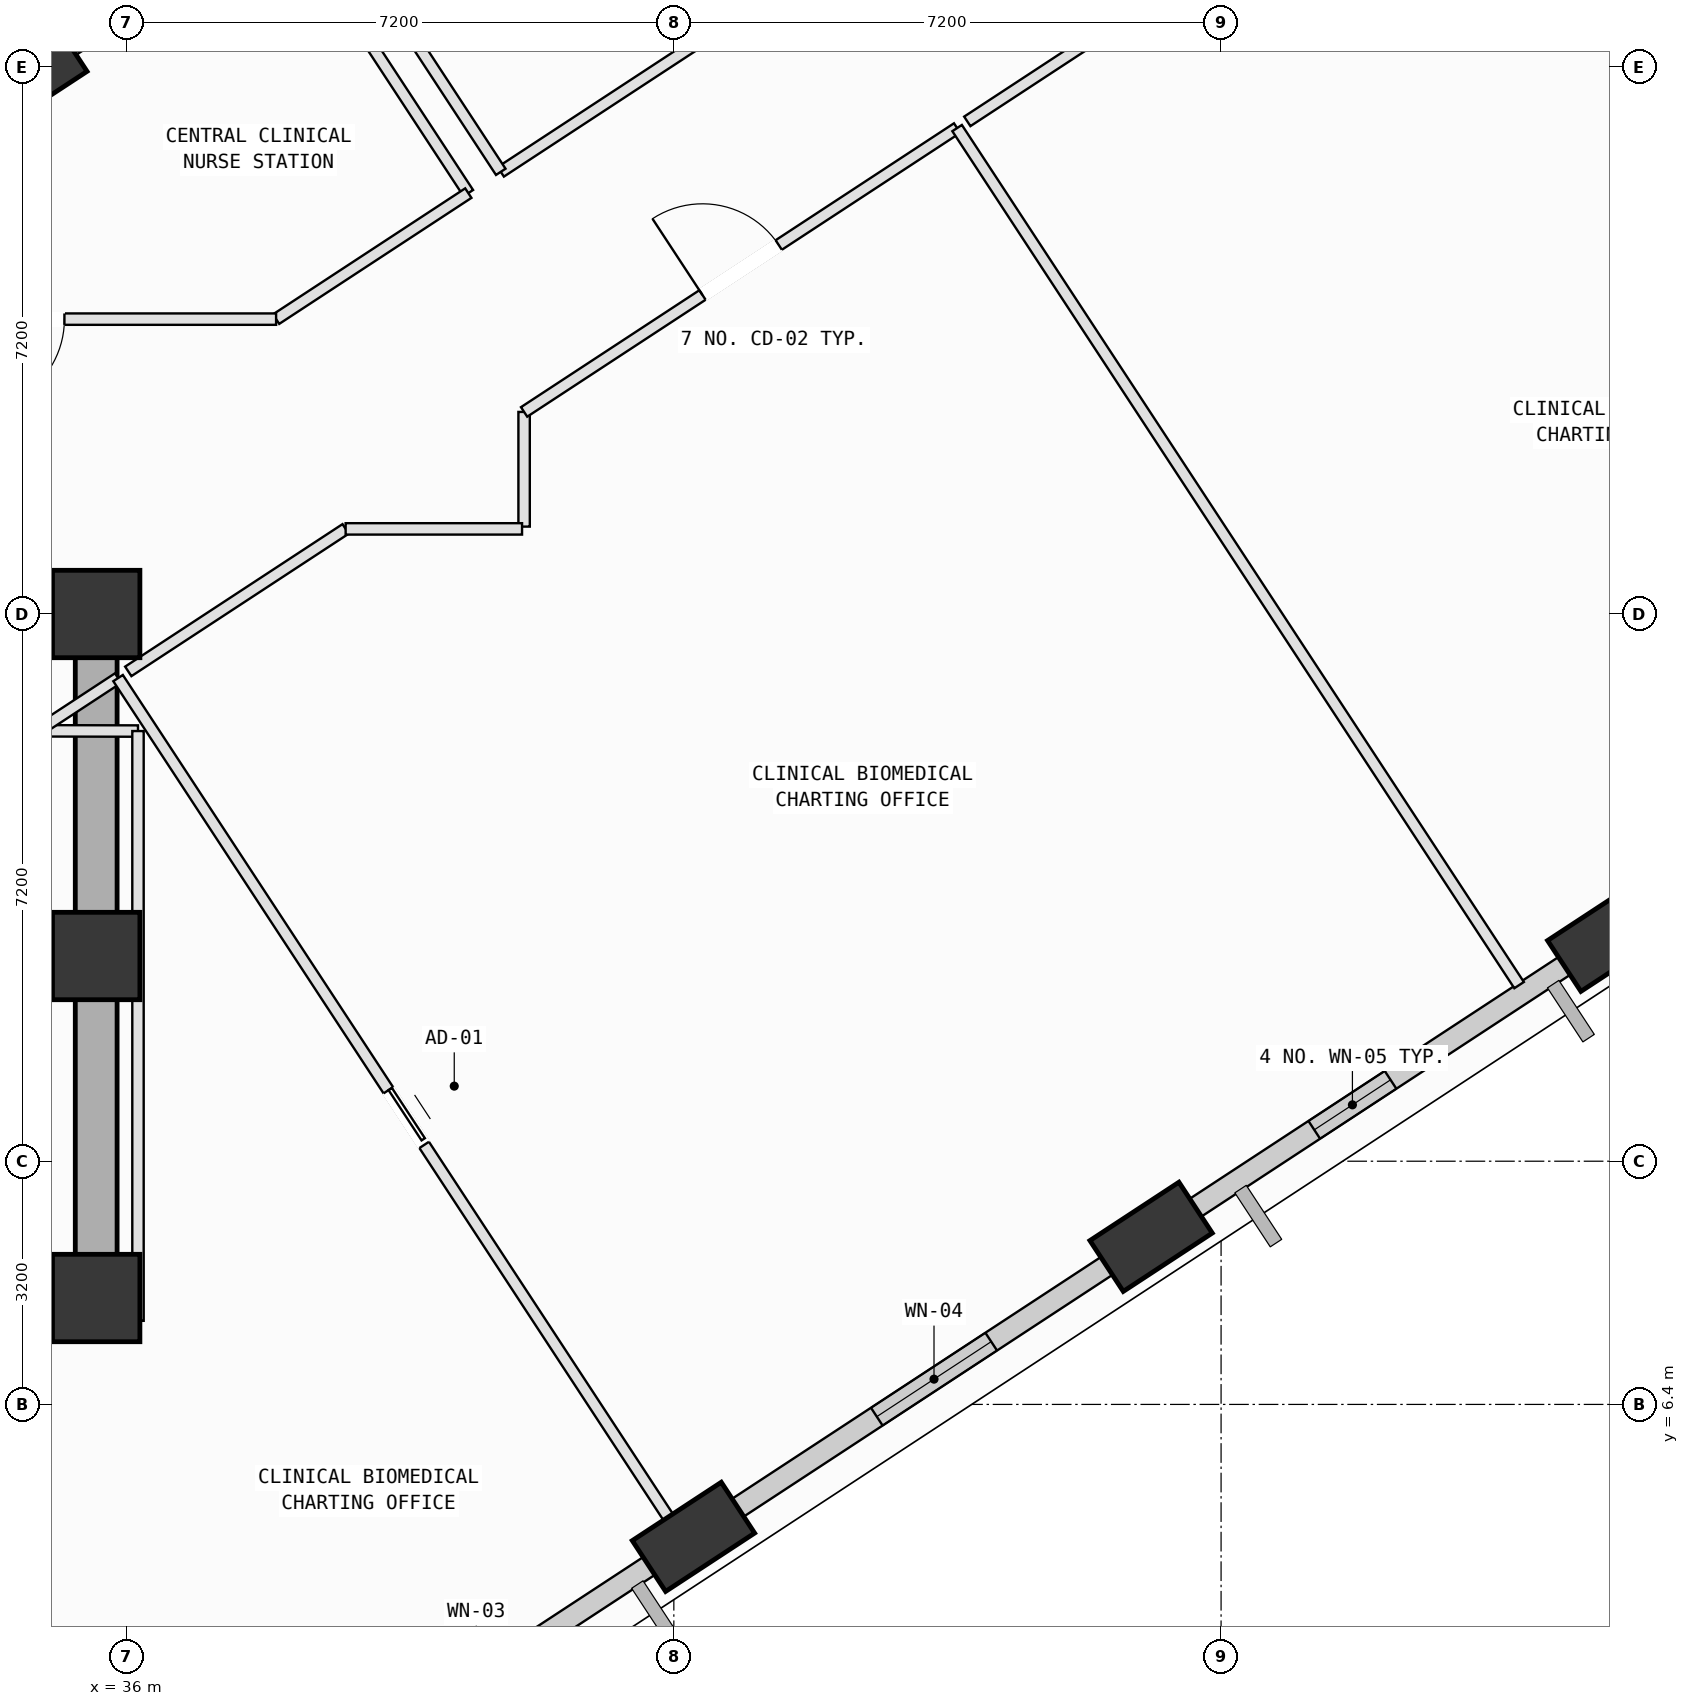
"""IFC4 building model, lengths in metres.
Left out: names, types, materials, properties, quantities, classifications, styles, units other than length and angle.
Written with IfcOpenShell. Run it as: python <this file> out.ifc"""

import sys

from ifc_helpers import new_model, si_unit, direction, frame, frame_2d, origin, origin_2d, place, context, subcontext, project, spatial, rectangle, extrude, element, fill, save


model = new_model("IFC4")
c1 = context("Model", 3, precision=1e-05, world=origin(), true_north=direction((0.0, 1.0)))
c2 = subcontext(c1, "Body", "Model", "MODEL_VIEW")
j1 = project(units=[si_unit("LENGTHUNIT", "METRE"), si_unit("PLANEANGLEUNIT", "RADIAN")], contexts=[c1])
p1 = place(None, origin())
s1 = spatial("IfcSite", under=j1, at=p1, CompositionType="ELEMENT")
p2 = place(p1, origin())
s2 = spatial("IfcBuilding", under=s1, at=p2, CompositionType="ELEMENT")
p3 = place(p2, frame((0.0, 0.0, 165.8)))
s3 = spatial("IfcBuildingStorey", under=s2, at=p3, CompositionType="ELEMENT", Elevation=165.8)
for number, where, z_axis, x_axis in (
    (1, (35.6, 7.8, 0.0), (0.0, 0.0, 1.0), (1.0, 0.0, 0.0)),
    (2, (35.6, 12.3, 0.0), (0.0, 0.0, 1.0), (1.0, 0.0, 0.0)),
    (3, (35.6, 16.8, 0.0), (0.0, 0.0, 1.0), (1.0, 0.0, 0.0)),
):
    element("IfcColumn", number, at=place(p3, frame(where, z_axis=z_axis, x_axis=x_axis)), inside=s3, PredefinedType="COLUMN", context=c2, shape_type="SweptSolid", body=[
        extrude(rectangle(XDim=1.15, YDim=1.15, at=origin_2d()), origin(), (0.0, 0.0, 1.0), 4.0),
    ])
p4 = place(p3, frame((43.458, 4.657, 0.002), z_axis=(0.082788142261, 0.041363656677, 0.995708376688), x_axis=(-0.862154123845, 0.504098662124, 0.050742542141)))
e4 = element("IfcColumn", 4, at=p4, inside=s3, PredefinedType="COLUMN", context=c2, shape_type="SweptSolid", body=[
    extrude(rectangle(XDim=1.4, YDim=0.8, at=origin_2d()), origin(), (0.0, 0.0, 1.0), 4.014),
])
p5 = place(p3, frame((49.479, 8.605, 0.002), z_axis=(0.066296769237, 0.066114301065, 0.995607170315), x_axis=(-0.977058462441, 0.206691483107, 0.051336067073)))
e5 = element("IfcColumn", 5, at=p5, inside=s3, PredefinedType="COLUMN", context=c2, shape_type="SweptSolid", body=[
    extrude(rectangle(XDim=1.4, YDim=0.8, at=origin_2d()), origin(), (0.0, 0.0, 1.0), 4.014),
])
p6 = place(p3, frame((55.5, 12.553, 0.002), z_axis=(0.049765035184, 0.090719410903, 0.994632308825), x_axis=(-0.995498317814, -0.07592385374, 0.056733302946)))
e6 = element("IfcColumn", 6, at=p6, inside=s3, PredefinedType="COLUMN", context=c2, shape_type="SweptSolid", body=[
    extrude(rectangle(XDim=1.4, YDim=0.8, at=origin_2d()), origin(), (0.0, 0.0, 1.0), 4.018),
])
p7 = place(p3, frame((34.675, 23.89, 0.002), z_axis=(0.003726493364, 0.004459574025, 0.999983112581), x_axis=(-0.99330109932, 0.115510919824, 0.003186454268)))
e7 = element("IfcColumn", 7, at=p7, inside=s3, PredefinedType="COLUMN", context=c2, shape_type="SweptSolid", body=[
    extrude(rectangle(XDim=1.4, YDim=0.8, at=origin_2d()), origin(), (0.0, 0.0, 1.0), 3.996),
])
p8 = place(p3, frame((43.198, 4.487, 0.0), z_axis=(0.0, 0.0, 1.0), x_axis=(-0.836280987902, -0.548301111865, 0.0)))
e8 = element("IfcWall", 8, at=p8, inside=s3, PredefinedType="SOLIDWALL", context=c2, shape_type="SweptSolid", body=[
    extrude(rectangle(XDim=6.214, YDim=0.28, at=frame_2d((3.107, 0.0))), origin(), (0.0, 0.0, 1.0), 3.165),
])
p9 = place(p8, frame((2.406, 0.0, 0.75)))
e9 = element("IfcOpeningElement", 9, at=p9, cuts=e8, PredefinedType="OPENING", context=c2, shape_type="SweptSolid", body=[
    extrude(rectangle(XDim=1.4, YDim=1.85, at=frame_2d((0.7, 0.925))), frame((0.0, 0.15, 0.0), z_axis=(0.0, -1.0, 0.0), x_axis=(1.0, 0.0, 0.0)), (0.0, 0.0, 1.0), 0.3),
])
p10 = place(p3, frame((49.219, 8.435, 0.0), z_axis=(0.0, 0.0, 1.0), x_axis=(-0.836296386282, -0.548277625197, 0.0)))
e10 = element("IfcWall", 10, at=p10, inside=s3, PredefinedType="SOLIDWALL", context=c2, shape_type="SweptSolid", body=[
    extrude(rectangle(XDim=6.209, YDim=0.28, at=frame_2d((3.104, 0.0))), origin(), (0.0, 0.0, 1.0), 3.165),
])
p11 = place(p10, frame((2.205, 0.0, 0.75)))
e11 = element("IfcOpeningElement", 11, at=p11, cuts=e10, PredefinedType="OPENING", context=c2, shape_type="SweptSolid", body=[
    extrude(rectangle(XDim=1.8, YDim=2.05, at=frame_2d((0.9, 1.025))), frame((0.0, 0.15, 0.0), z_axis=(0.0, -1.0, 0.0), x_axis=(1.0, 0.0, 0.0)), (0.0, 0.0, 1.0), 0.3),
])
p12 = place(p3, frame((55.247, 12.387, 0.0), z_axis=(0.0, 0.0, 1.0), x_axis=(-0.836284210267, -0.548296197013, 0.0)))
e12 = element("IfcWall", 12, at=p12, inside=s3, PredefinedType="SOLIDWALL", context=c2, shape_type="SweptSolid", body=[
    extrude(rectangle(XDim=6.218, YDim=0.28, at=frame_2d((3.109, 0.0))), origin(), (0.0, 0.0, 1.0), 3.165),
])
p13 = place(p12, frame((3.13, 0.0, 0.75)))
e13 = element("IfcOpeningElement", 13, at=p13, cuts=e12, PredefinedType="OPENING", context=c2, shape_type="SweptSolid", body=[
    extrude(rectangle(XDim=1.2, YDim=1.75, at=frame_2d((0.6, 0.875))), frame((0.0, 0.15, 0.0), z_axis=(0.0, -1.0, 0.0), x_axis=(1.0, 0.0, 0.0)), (0.0, 0.0, 1.0), 0.3),
])
p14 = place(p3, frame((35.099, 24.168, 0.0), z_axis=(0.0, 0.0, 1.0), x_axis=(0.836267517438, 0.548321656765, 0.0)))
e14 = element("IfcWall", 14, at=p14, inside=s3, PredefinedType="SOLIDWALL", context=c2, shape_type="SweptSolid", body=[
    extrude(rectangle(XDim=3.33, YDim=0.28, at=frame_2d((1.665, 0.0))), origin(), (0.0, 0.0, 1.0), 3.145),
])
p15 = place(p14, frame((0.74, 0.0, 0.75)))
e15 = element("IfcOpeningElement", 15, at=p15, cuts=e14, PredefinedType="OPENING", context=c2, shape_type="SweptSolid", body=[
    extrude(rectangle(XDim=2.0, YDim=1.95, at=frame_2d((1.0, 0.975))), frame((0.0, 0.15, 0.0), z_axis=(0.0, -1.0, 0.0), x_axis=(1.0, 0.0, 0.0)), (0.0, 0.0, 1.0), 0.3),
])
p16 = place(p3, frame((24.8, 7.8, 0.0), z_axis=(0.0, 0.0, 1.0), x_axis=(1.0, 0.0, 0.0)))
e16 = element("IfcWall", 16, at=p16, inside=s3, PredefinedType="SHEAR", context=c2, shape_type="SweptSolid", body=[
    extrude(rectangle(XDim=10.8, YDim=0.55, at=frame_2d((5.4, 0.0))), origin(), (0.0, 0.0, 1.0), 3.78),
])
p17 = place(p3, frame((35.6, 7.8, 0.0), z_axis=(0.0, 0.0, 1.0), x_axis=(0.0, 1.0, 0.0)))
e17 = element("IfcWall", 17, at=p17, inside=s3, PredefinedType="SHEAR", context=c2, shape_type="SweptSolid", body=[
    extrude(rectangle(XDim=9.0, YDim=0.55, at=frame_2d((4.5, 0.0))), origin(), (0.0, 0.0, 1.0), 3.78),
])
p18 = place(p3, frame((36.15, 15.26, 0.0), z_axis=(0.0, 0.0, 1.0), x_axis=(-0.999997459877, 0.002253938677, 0.0)))
e18 = element("IfcWall", 18, at=p18, inside=s3, PredefinedType="PARTITIONING", context=c2, shape_type="SweptSolid", body=[
    extrude(rectangle(XDim=1.3, YDim=0.15, at=frame_2d((0.65, 0.0))), origin(), (0.0, 0.0, 1.0), 3.78),
])
p19 = place(p3, frame((34.85, 15.276, 0.0), z_axis=(0.0, 0.0, 1.0), x_axis=(0.836022538156, 0.548695102671, 0.0)))
e19 = element("IfcWall", 19, at=p19, inside=s3, PredefinedType="PARTITIONING", context=c2, shape_type="SweptSolid", body=[
    extrude(rectangle(XDim=1.241, YDim=0.15, at=frame_2d((0.621, 0.0))), origin(), (0.0, 0.0, 1.0), 3.78),
])
p20 = place(p3, frame((35.888, 15.957, 0.0), z_axis=(0.0, 0.0, 1.0), x_axis=(0.548296249178, -0.836284176065, 0.0)))
e20 = element("IfcWall", 20, at=p20, inside=s3, PredefinedType="PARTITIONING", context=c2, shape_type="SweptSolid", body=[
    extrude(rectangle(XDim=13.83, YDim=0.15, at=frame_2d((6.915, 0.0))), origin(), (0.0, 0.0, 1.0), 3.78),
])
p21 = place(p20, frame((6.485, 0.0, 0.0)))
e21 = element("IfcOpeningElement", 21, at=p21, cuts=e20, PredefinedType="OPENING", context=c2, shape_type="SweptSolid", body=[
    extrude(rectangle(XDim=0.86, YDim=2.06, at=frame_2d((0.43, 1.03))), frame((0.0, 0.085, 0.0), z_axis=(0.0, -1.0, 0.0), x_axis=(1.0, 0.0, 0.0)), (0.0, 0.0, 1.0), 0.17),
])
p22 = place(p3, frame((35.6, 7.5, 0.0), z_axis=(0.0, 0.0, 1.0), x_axis=(1.0, 0.0, 0.0)))
e22 = element("IfcWall", 22, at=p22, inside=s3, PredefinedType="PARTITIONING", context=c2, shape_type="SweptSolid", body=[
    extrude(rectangle(XDim=0.55, YDim=0.15, at=frame_2d((0.275, 0.0))), origin(), (0.0, 0.0, 1.0), 3.065),
])
p23 = place(p3, frame((36.15, 7.5, 0.0), z_axis=(0.0, 0.0, 1.0), x_axis=(0.0, 1.0, 0.0)))
e23 = element("IfcWall", 23, at=p23, inside=s3, PredefinedType="PARTITIONING", context=c2, shape_type="SweptSolid", body=[
    extrude(rectangle(XDim=7.76, YDim=0.15, at=frame_2d((3.88, 0.0))), origin(), (0.0, 0.0, 1.0), 3.065),
])
p24 = place(p3, frame((41.23, 17.95, 0.0), z_axis=(0.0, 0.0, 1.0), x_axis=(0.0, 1.0, 0.0)))
e24 = element("IfcWall", 24, at=p24, inside=s3, PredefinedType="PARTITIONING", context=c2, shape_type="SweptSolid", body=[
    extrude(rectangle(XDim=1.509, YDim=0.15, at=frame_2d((0.754, 0.0))), origin(), (0.0, 0.0, 1.0), 3.78),
])
p25 = place(p3, frame((41.23, 19.459, 0.0), z_axis=(0.0, 0.0, 1.0), x_axis=(0.836287739874, 0.548290813471, 0.0)))
e25 = element("IfcWall", 25, at=p25, inside=s3, PredefinedType="PARTITIONING", context=c2, shape_type="SweptSolid", body=[
    extrude(rectangle(XDim=6.812, YDim=0.15, at=frame_2d((3.406, 0.0))), origin(), (0.0, 0.0, 1.0), 3.065),
])
p26 = place(p25, frame((2.806, 0.0, 0.0)))
e26 = element("IfcOpeningElement", 26, at=p26, cuts=e25, PredefinedType="OPENING", context=c2, shape_type="SweptSolid", body=[
    extrude(rectangle(XDim=1.2, YDim=2.15, at=frame_2d((0.6, 1.075))), frame((0.0, 0.085, 0.0), z_axis=(0.0, -1.0, 0.0), x_axis=(1.0, 0.0, 0.0)), (0.0, 0.0, 1.0), 0.17),
])
p27 = place(p3, frame((46.927, 23.194, 0.0), z_axis=(0.0, 0.0, 1.0), x_axis=(0.54831669657, -0.836270769705, 0.0)))
e27 = element("IfcWall", 27, at=p27, inside=s3, PredefinedType="PARTITIONING", context=c2, shape_type="SweptSolid", body=[
    extrude(rectangle(XDim=13.485, YDim=0.15, at=frame_2d((6.743, 0.0))), origin(), (0.0, 0.0, 1.0), 3.415),
])
p28 = place(p3, frame((50.173, 8.785, 0.0), z_axis=(0.0, 0.0, 1.0), x_axis=(-0.836726177972, -0.547621496196, 0.0)))
e28 = element("IfcWall", 28, at=p28, inside=s3, PredefinedType="PARTITIONING", context=c2, shape_type="SweptSolid", body=[
    extrude(rectangle(XDim=0.99, YDim=0.15, at=frame_2d((0.495, 0.0))), origin(), (0.0, 0.0, 1.0), 3.165),
])
p29 = place(p3, frame((44.153, 4.838, 0.0), z_axis=(0.0, 0.0, 1.0), x_axis=(-0.836608362839, -0.547801466982, 0.0)))
e29 = element("IfcWall", 29, at=p29, inside=s3, PredefinedType="PARTITIONING", context=c2, shape_type="SweptSolid", body=[
    extrude(rectangle(XDim=0.655, YDim=0.15, at=frame_2d((0.328, 0.0))), origin(), (0.0, 0.0, 1.0), 3.165),
])
p30 = place(p3, frame((36.022, 16.045, 0.0), z_axis=(0.0, 0.0, 1.0), x_axis=(0.836308759612, 0.5482587515, 0.0)))
e30 = element("IfcWall", 30, at=p30, inside=s3, PredefinedType="PARTITIONING", context=c2, shape_type="SweptSolid", body=[
    extrude(rectangle(XDim=3.42, YDim=0.15, at=frame_2d((1.71, 0.0))), origin(), (0.0, 0.0, 1.0), 3.78),
])
p31 = place(p3, frame((38.882, 17.92, 0.0), z_axis=(0.0, 0.0, 1.0), x_axis=(1.0, 0.0, 0.0)))
e31 = element("IfcWall", 31, at=p31, inside=s3, PredefinedType="PARTITIONING", context=c2, shape_type="SweptSolid", body=[
    extrude(rectangle(XDim=2.321, YDim=0.15, at=frame_2d((1.16, 0.0))), origin(), (0.0, 0.0, 1.0), 3.78),
])
p32 = place(p3, frame((47.061, 23.282, 0.0), z_axis=(0.0, 0.0, 1.0), x_axis=(0.836276104337, 0.548308560315, 0.0)))
e32 = element("IfcWall", 32, at=p32, inside=s3, PredefinedType="PARTITIONING", context=c2, shape_type="SweptSolid", body=[
    extrude(rectangle(XDim=10.64, YDim=0.15, at=frame_2d((5.32, 0.0))), origin(), (0.0, 0.0, 1.0), 3.78),
])
p33 = place(p32, frame((4.72, 0.0, 0.0)))
e33 = element("IfcOpeningElement", 33, at=p33, cuts=e32, PredefinedType="OPENING", context=c2, shape_type="SweptSolid", body=[
    extrude(rectangle(XDim=1.2, YDim=2.15, at=frame_2d((0.6, 1.075))), frame((0.0, 0.085, 0.0), z_axis=(0.0, -1.0, 0.0), x_axis=(1.0, 0.0, 0.0)), (0.0, 0.0, 1.0), 0.17),
])
p34 = place(p3, frame((56.187, 12.728, 0.0), z_axis=(0.0, 0.0, 1.0), x_axis=(-0.836155745767, -0.54849208638, 0.0)))
e34 = element("IfcWall", 34, at=p34, inside=s3, PredefinedType="PARTITIONING", context=c2, shape_type="SweptSolid", body=[
    extrude(rectangle(XDim=0.973, YDim=0.15, at=frame_2d((0.487, 0.0))), origin(), (0.0, 0.0, 1.0), 3.165),
])
p35 = place(p3, frame((29.021, 20.841, 0.0), z_axis=(0.0, 0.0, 1.0), x_axis=(0.836283520449, 0.54829724915, 0.0)))
e35 = element("IfcWall", 35, at=p35, inside=s3, PredefinedType="PARTITIONING", context=c2, shape_type="SweptSolid", body=[
    extrude(rectangle(XDim=10.171, YDim=0.15, at=frame_2d((5.086, 0.0))), origin(), (0.0, 0.0, 1.0), 3.78),
])
p36 = place(p3, frame((39.125, 24.429, 0.0), z_axis=(0.0, 0.0, 1.0), x_axis=(0.548330098424, -0.836261982373, 0.0)))
e36 = element("IfcWall", 36, at=p36, inside=s3, PredefinedType="PARTITIONING", context=c2, shape_type="SweptSolid", body=[
    extrude(rectangle(XDim=2.5, YDim=0.15, at=frame_2d((1.25, 0.0))), origin(), (0.0, 0.0, 1.0), 3.78),
])
p37 = place(p3, frame((40.496, 22.338, 0.0), z_axis=(0.0, 0.0, 1.0), x_axis=(-0.836310513297, -0.548256076436, 0.0)))
e37 = element("IfcWall", 37, at=p37, inside=s3, PredefinedType="PARTITIONING", context=c2, shape_type="SweptSolid", body=[
    extrude(rectangle(XDim=3.024, YDim=0.15, at=frame_2d((1.512, 0.0))), origin(), (0.0, 0.0, 1.0), 3.045),
])
p38 = place(p3, frame((37.967, 20.68, 0.0), z_axis=(0.0, 0.0, 1.0), x_axis=(-1.0, 0.0, 0.0)))
e38 = element("IfcWall", 38, at=p38, inside=s3, PredefinedType="PARTITIONING", context=c2, shape_type="SweptSolid", body=[
    extrude(rectangle(XDim=6.77, YDim=0.15, at=frame_2d((3.385, 0.0))), origin(), (0.0, 0.0, 1.0), 3.415),
])
p39 = place(p38, frame((2.785, 0.0, 0.0)))
e39 = element("IfcOpeningElement", 39, at=p39, cuts=e38, PredefinedType="OPENING", context=c2, shape_type="SweptSolid", body=[
    extrude(rectangle(XDim=1.2, YDim=2.15, at=frame_2d((0.6, 1.075))), frame((0.0, 0.085, 0.0), z_axis=(0.0, -1.0, 0.0), x_axis=(1.0, 0.0, 0.0)), (0.0, 0.0, 1.0), 0.17),
])
p40 = place(p3, frame((49.979, 28.555, 0.0), z_axis=(0.0, 0.0, 1.0), x_axis=(-0.836298938049, -0.548273732927, 0.0)))
e40 = element("IfcWall", 40, at=p40, inside=s3, PredefinedType="PARTITIONING", context=c2, shape_type="SweptSolid", body=[
    extrude(rectangle(XDim=10.829, YDim=0.15, at=frame_2d((5.414, 0.0))), origin(), (0.0, 0.0, 1.0), 3.78),
])
p41 = place(p40, frame((4.814, 0.0, 0.0)))
e41 = element("IfcOpeningElement", 41, at=p41, cuts=e40, PredefinedType="OPENING", context=c2, shape_type="SweptSolid", body=[
    extrude(rectangle(XDim=1.2, YDim=2.15, at=frame_2d((0.6, 1.075))), frame((0.0, 0.085, 0.0), z_axis=(0.0, -1.0, 0.0), x_axis=(1.0, 0.0, 0.0)), (0.0, 0.0, 1.0), 0.17),
])
p42 = place(p3, frame((40.923, 22.618, 0.0), z_axis=(0.0, 0.0, 1.0), x_axis=(-0.548192826292, 0.836351974471, 0.0)))
e42 = element("IfcWall", 42, at=p42, inside=s3, PredefinedType="PARTITIONING", context=c2, shape_type="SweptSolid", body=[
    extrude(rectangle(XDim=2.405, YDim=0.15, at=frame_2d((1.202, 0.0))), origin(), (0.0, 0.0, 1.0), 3.78),
])
p43 = place(p11, origin())
e43 = element("IfcWindow", 43, at=p43, inside=s3, PartitioningType="SINGLE_PANEL", PredefinedType="WINDOW", context=c2, shape_type="SweptSolid", body=[
    extrude(rectangle(XDim=1.8, YDim=2.05, at=frame_2d((0.9, 1.025))), frame((0.0, 0.03, 0.0), z_axis=(0.0, -1.0, 0.0), x_axis=(1.0, 0.0, 0.0)), (0.0, 0.0, 1.0), 0.06),
])
fill(e11, e43)
p44 = place(p13, origin())
e44 = element("IfcWindow", 44, at=p44, inside=s3, PartitioningType="SINGLE_PANEL", PredefinedType="WINDOW", context=c2, shape_type="SweptSolid", body=[
    extrude(rectangle(XDim=1.2, YDim=1.75, at=frame_2d((0.6, 0.875))), frame((0.0, 0.03, 0.0), z_axis=(0.0, -1.0, 0.0), x_axis=(1.0, 0.0, 0.0)), (0.0, 0.0, 1.0), 0.06),
])
fill(e13, e44)
p45 = place(p26, origin())
e45 = element("IfcDoor", 45, at=p45, inside=s3, OperationType="SINGLE_SWING_LEFT", PredefinedType="DOOR", context=c2, shape_type="SweptSolid", body=[
    extrude(rectangle(XDim=1.2, YDim=2.15, at=frame_2d((0.6, 1.075))), frame((0.0, 0.025, 0.0), z_axis=(0.0, -1.0, 0.0), x_axis=(1.0, 0.0, 0.0)), (0.0, 0.0, 1.0), 0.05),
])
fill(e26, e45)
p46 = place(p39, origin())
e46 = element("IfcDoor", 46, at=p46, inside=s3, OperationType="SINGLE_SWING_RIGHT", PredefinedType="DOOR", context=c2, shape_type="SweptSolid", body=[
    extrude(rectangle(XDim=1.2, YDim=2.15, at=frame_2d((0.6, 1.075))), frame((0.0, 0.025, 0.0), z_axis=(0.0, -1.0, 0.0), x_axis=(1.0, 0.0, 0.0)), (0.0, 0.0, 1.0), 0.05),
])
fill(e39, e46)
p47 = place(p21, origin())
e47 = element("IfcDoor", 47, at=p47, inside=s3, OperationType="SLIDING_TO_LEFT", PredefinedType="DOOR", context=c2, shape_type="SweptSolid", body=[
    extrude(rectangle(XDim=0.86, YDim=2.06, at=frame_2d((0.43, 1.03))), frame((0.0, 0.025, 0.0), z_axis=(0.0, -1.0, 0.0), x_axis=(1.0, 0.0, 0.0)), (0.0, 0.0, 1.0), 0.05),
])
fill(e21, e47)
save(model, sys.argv[1])
